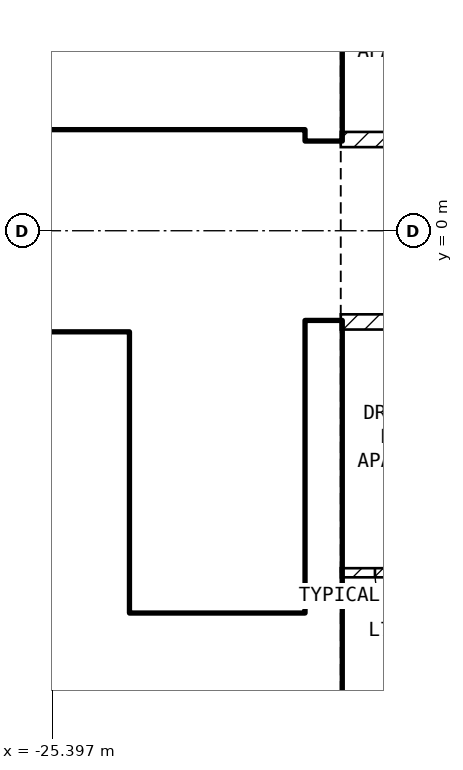
"""IFC4 building model, lengths in metres.
Left out: names, types, materials, properties, quantities, classifications, styles, units other than length and angle.
Written with IfcOpenShell. Run it as: python <this file> out.ifc"""

import sys

from ifc_helpers import new_model, si_unit, direction, frame, frame_2d, origin, place, context, subcontext, project, spatial, rectangle, extrude, element, fill, save


model = new_model("IFC4")
c1 = context("Model", 3, precision=1e-05, world=origin(), true_north=direction((0.0, 1.0)))
c2 = subcontext(c1, "Body", "Model", "MODEL_VIEW")
j1 = project(units=[si_unit("LENGTHUNIT", "METRE"), si_unit("PLANEANGLEUNIT", "RADIAN")], contexts=[c1])
p1 = place(None, origin())
s1 = spatial("IfcSite", under=j1, at=p1, CompositionType="ELEMENT")
p2 = place(p1, origin())
s2 = spatial("IfcBuilding", under=s1, at=p2, CompositionType="ELEMENT")
p3 = place(p2, frame((0.0, 0.0, 281.5)))
s3 = spatial("IfcBuildingStorey", under=s2, at=p3, CompositionType="ELEMENT", Elevation=281.5)
for number, where, z_axis, x_axis in (
    (1, (-21.825, -8.1, 0.0), (0.0, 0.0, 1.0), (0.0, 1.0, 0.0)),
    (2, (-21.825, 1.2, 0.0), (0.0, 0.0, 1.0), (0.0, 1.0, 0.0)),
):
    element("IfcWall", number, at=place(p3, frame(where, z_axis=z_axis, x_axis=x_axis)), inside=s3, PredefinedType="SHEAR", context=c2, shape_type="SweptSolid", body=[
        extrude(rectangle(XDim=6.9, YDim=0.45, at=frame_2d((3.45, 0.0))), origin(), (0.0, 0.0, 1.0), 3.2),
    ])
p4 = place(p3, frame((-33.35, 1.45, 0.0), z_axis=(0.0, 0.0, 1.0), x_axis=(1.0, 0.0, 0.0)))
e3 = element("IfcWall", 3, at=p4, inside=s3, PredefinedType="SOLIDWALL", context=c2, shape_type="SweptSolid", body=[
    extrude(rectangle(XDim=11.3, YDim=0.2, at=frame_2d((5.65, 0.0))), origin(), (0.0, 0.0, 1.0), 3.2),
])
p5 = place(p4, frame((9.55, 0.0, 0.0)))
e4 = element("IfcOpeningElement", 4, at=p5, cuts=e3, PredefinedType="OPENING", context=c2, shape_type="SweptSolid", body=[
    extrude(rectangle(XDim=1.0, YDim=2.1, at=frame_2d((0.5, 1.05))), frame((0.0, 0.11, 0.0), z_axis=(0.0, -1.0, 0.0), x_axis=(1.0, 0.0, 0.0)), (0.0, 0.0, 1.0), 0.22),
])
p6 = place(p4, frame((7.05, 0.0, 0.0)))
e5 = element("IfcOpeningElement", 5, at=p6, cuts=e3, PredefinedType="OPENING", context=c2, shape_type="SweptSolid", body=[
    extrude(rectangle(XDim=1.0, YDim=2.1, at=frame_2d((0.5, 1.05))), frame((0.0, 0.11, 0.0), z_axis=(0.0, -1.0, 0.0), x_axis=(1.0, 0.0, 0.0)), (0.0, 0.0, 1.0), 0.22),
])
p7 = place(p4, frame((1.175, 0.0, 0.0)))
e6 = element("IfcOpeningElement", 6, at=p7, cuts=e3, PredefinedType="OPENING", context=c2, shape_type="SweptSolid", body=[
    extrude(rectangle(XDim=0.9, YDim=2.1, at=frame_2d((0.45, 1.05))), frame((0.0, 0.11, 0.0), z_axis=(0.0, -1.0, 0.0), x_axis=(1.0, 0.0, 0.0)), (0.0, 0.0, 1.0), 0.22),
])
p8 = place(p3, frame((-24.5, -5.05, 0.0), z_axis=(0.0, 0.0, 1.0), x_axis=(0.0, 1.0, 0.0)))
e7 = element("IfcWall", 7, at=p8, inside=s3, PredefinedType="SOLIDWALL", context=c2, shape_type="SweptSolid", body=[
    extrude(rectangle(XDim=3.7, YDim=0.2, at=frame_2d((1.85, 0.0))), origin(), (0.0, 0.0, 1.0), 3.2),
])
p9 = place(p8, frame((0.1, 0.0, 0.0)))
e8 = element("IfcOpeningElement", 8, at=p9, cuts=e7, PredefinedType="OPENING", context=c2, shape_type="SweptSolid", body=[
    extrude(rectangle(XDim=0.8, YDim=2.1, at=frame_2d((0.4, 1.05))), frame((0.0, 0.11, 0.0), z_axis=(0.0, -1.0, 0.0), x_axis=(1.0, 0.0, 0.0)), (0.0, 0.0, 1.0), 0.22),
])
p10 = place(p3, frame((-28.35, -5.15, 0.0), z_axis=(0.0, 0.0, 1.0), x_axis=(1.0, 0.0, 0.0)))
e9 = element("IfcWall", 9, at=p10, inside=s3, PredefinedType="SOLIDWALL", context=c2, shape_type="SweptSolid", body=[
    extrude(rectangle(XDim=6.3, YDim=0.2, at=frame_2d((3.15, 0.0))), origin(), (0.0, 0.0, 1.0), 3.2),
])
p11 = place(p10, frame((5.1, 0.0, 0.0)))
e10 = element("IfcOpeningElement", 10, at=p11, cuts=e9, PredefinedType="OPENING", context=c2, shape_type="SweptSolid", body=[
    extrude(rectangle(XDim=1.0, YDim=2.1, at=frame_2d((0.5, 1.05))), frame((0.0, 0.11, 0.0), z_axis=(0.0, -1.0, 0.0), x_axis=(1.0, 0.0, 0.0)), (0.0, 0.0, 1.0), 0.22),
])
p12 = place(p3, frame((-33.35, -1.45, 0.0), z_axis=(0.0, 0.0, 1.0), x_axis=(1.0, 0.0, 0.0)))
e11 = element("IfcWall", 11, at=p12, inside=s3, PredefinedType="SOLIDWALL", context=c2, shape_type="SweptSolid", body=[
    extrude(rectangle(XDim=8.75, YDim=0.2, at=frame_2d((4.375, 0.0))), origin(), (0.0, 0.0, 1.0), 3.2),
])
p13 = place(p12, frame((7.35, 0.0, 0.0)))
e12 = element("IfcOpeningElement", 12, at=p13, cuts=e11, PredefinedType="OPENING", context=c2, shape_type="SweptSolid", body=[
    extrude(rectangle(XDim=1.0, YDim=2.1, at=frame_2d((0.5, 1.05))), frame((0.0, 0.11, 0.0), z_axis=(0.0, -1.0, 0.0), x_axis=(1.0, 0.0, 0.0)), (0.0, 0.0, 1.0), 0.22),
])
p14 = place(p12, frame((5.35, 0.0, 0.0)))
e13 = element("IfcOpeningElement", 13, at=p14, cuts=e11, PredefinedType="OPENING", context=c2, shape_type="SweptSolid", body=[
    extrude(rectangle(XDim=1.0, YDim=2.1, at=frame_2d((0.5, 1.05))), frame((0.0, 0.11, 0.0), z_axis=(0.0, -1.0, 0.0), x_axis=(1.0, 0.0, 0.0)), (0.0, 0.0, 1.0), 0.22),
])
p15 = place(p12, frame((3.35, 0.0, 0.0)))
e14 = element("IfcOpeningElement", 14, at=p15, cuts=e11, PredefinedType="OPENING", context=c2, shape_type="SweptSolid", body=[
    extrude(rectangle(XDim=1.0, YDim=2.1, at=frame_2d((0.5, 1.05))), frame((0.0, 0.11, 0.0), z_axis=(0.0, -1.0, 0.0), x_axis=(1.0, 0.0, 0.0)), (0.0, 0.0, 1.0), 0.22),
])
p16 = place(p12, frame((0.925, 0.0, 0.0)))
e15 = element("IfcOpeningElement", 15, at=p16, cuts=e11, PredefinedType="OPENING", context=c2, shape_type="SweptSolid", body=[
    extrude(rectangle(XDim=0.9, YDim=2.1, at=frame_2d((0.45, 1.05))), frame((0.0, 0.11, 0.0), z_axis=(0.0, -1.0, 0.0), x_axis=(1.0, 0.0, 0.0)), (0.0, 0.0, 1.0), 0.22),
])
p17 = place(p3, frame((-33.35, -3.95, 0.0), z_axis=(0.0, 0.0, 1.0), x_axis=(1.0, 0.0, 0.0)))
e16 = element("IfcWall", 16, at=p17, inside=s3, PredefinedType="SOLIDWALL", context=c2, shape_type="SweptSolid", body=[
    extrude(rectangle(XDim=8.75, YDim=0.2, at=frame_2d((4.375, 0.0))), origin(), (0.0, 0.0, 1.0), 3.2),
])
p18 = place(p3, frame((-21.6, 1.2, 0.0), z_axis=(0.0, 0.0, 1.0), x_axis=(1.0, 0.0, 0.0)))
e17 = element("IfcWall", 17, at=p18, inside=s3, PredefinedType="PARTITIONING", context=c2, shape_type="SweptSolid", body=[
    extrude(rectangle(XDim=17.2, YDim=0.2, at=frame_2d((8.6, 0.0))), origin(), (0.0, 0.0, 1.0), 3.2),
])
p19 = place(p18, frame((10.3, 0.0, 0.0)))
e18 = element("IfcOpeningElement", 18, at=p19, cuts=e17, PredefinedType="OPENING", context=c2, shape_type="SweptSolid", body=[
    extrude(rectangle(XDim=1.0, YDim=2.1, at=frame_2d((0.5, 1.05))), frame((0.0, 0.11, 0.0), z_axis=(0.0, -1.0, 0.0), x_axis=(1.0, 0.0, 0.0)), (0.0, 0.0, 1.0), 0.22),
])
p20 = place(p3, frame((-4.4, -1.2, 0.0), z_axis=(0.0, 0.0, 1.0), x_axis=(-1.0, 0.0, 0.0)))
e19 = element("IfcWall", 19, at=p20, inside=s3, PredefinedType="PARTITIONING", context=c2, shape_type="SweptSolid", body=[
    extrude(rectangle(XDim=17.2, YDim=0.2, at=frame_2d((8.6, 0.0))), origin(), (0.0, 0.0, 1.0), 3.2),
])
p21 = place(p20, frame((5.9, 0.0, 0.0)))
e20 = element("IfcOpeningElement", 20, at=p21, cuts=e19, PredefinedType="OPENING", context=c2, shape_type="SweptSolid", body=[
    extrude(rectangle(XDim=1.0, YDim=2.1, at=frame_2d((0.5, 1.05))), frame((0.0, 0.11, 0.0), z_axis=(0.0, -1.0, 0.0), x_axis=(1.0, 0.0, 0.0)), (0.0, 0.0, 1.0), 0.22),
])
p22 = place(p3, frame((-19.8, -4.5, 0.0), z_axis=(0.0, 0.0, 1.0), x_axis=(-1.0, 0.0, 0.0)))
e21 = element("IfcWall", 21, at=p22, inside=s3, PredefinedType="PARTITIONING", context=c2, shape_type="SweptSolid", body=[
    extrude(rectangle(XDim=1.8, YDim=0.12, at=frame_2d((0.9, 0.0))), origin(), (0.0, 0.0, 1.0), 3.2),
])
p23 = place(p22, frame((0.45, 0.0, 0.0)))
e22 = element("IfcOpeningElement", 22, at=p23, cuts=e21, PredefinedType="OPENING", context=c2, shape_type="SweptSolid", body=[
    extrude(rectangle(XDim=0.9, YDim=2.1, at=frame_2d((0.45, 1.05))), frame((0.0, 0.07, 0.0), z_axis=(0.0, -1.0, 0.0), x_axis=(1.0, 0.0, 0.0)), (0.0, 0.0, 1.0), 0.14),
])
p24 = place(p13, origin())
e23 = element("IfcDoor", 23, at=p24, inside=s3, OperationType="DOUBLE_DOOR_SLIDING", PredefinedType="DOOR", context=c2, shape_type="SweptSolid", body=[
    extrude(rectangle(XDim=1.0, YDim=2.1, at=frame_2d((0.5, 1.05))), frame((0.0, 0.025, 0.0), z_axis=(0.0, -1.0, 0.0), x_axis=(1.0, 0.0, 0.0)), (0.0, 0.0, 1.0), 0.05),
])
fill(e12, e23)
p25 = place(p11, origin())
e24 = element("IfcDoor", 24, at=p25, inside=s3, OperationType="SINGLE_SWING_LEFT", PredefinedType="DOOR", context=c2, shape_type="SweptSolid", body=[
    extrude(rectangle(XDim=1.0, YDim=2.1, at=frame_2d((0.5, 1.05))), frame((0.0, 0.025, 0.0), z_axis=(0.0, -1.0, 0.0), x_axis=(1.0, 0.0, 0.0)), (0.0, 0.0, 1.0), 0.05),
])
fill(e10, e24)
p26 = place(p5, origin())
e25 = element("IfcDoor", 25, at=p26, inside=s3, OperationType="SINGLE_SWING_LEFT", PredefinedType="DOOR", context=c2, shape_type="SweptSolid", body=[
    extrude(rectangle(XDim=1.0, YDim=2.1, at=frame_2d((0.5, 1.05))), frame((0.0, 0.025, 0.0), z_axis=(0.0, -1.0, 0.0), x_axis=(1.0, 0.0, 0.0)), (0.0, 0.0, 1.0), 0.05),
])
fill(e4, e25)
p27 = place(p9, origin())
e26 = element("IfcDoor", 26, at=p27, inside=s3, OperationType="SINGLE_SWING_LEFT", PredefinedType="DOOR", context=c2, shape_type="SweptSolid", body=[
    extrude(rectangle(XDim=0.8, YDim=2.1, at=frame_2d((0.4, 1.05))), frame((0.0, 0.025, 0.0), z_axis=(0.0, -1.0, 0.0), x_axis=(1.0, 0.0, 0.0)), (0.0, 0.0, 1.0), 0.05),
])
fill(e8, e26)
p28 = place(p6, origin())
e27 = element("IfcDoor", 27, at=p28, inside=s3, OperationType="SINGLE_SWING_LEFT", PredefinedType="DOOR", context=c2, shape_type="SweptSolid", body=[
    extrude(rectangle(XDim=1.0, YDim=2.1, at=frame_2d((0.5, 1.05))), frame((0.0, 0.025, 0.0), z_axis=(0.0, -1.0, 0.0), x_axis=(1.0, 0.0, 0.0)), (0.0, 0.0, 1.0), 0.05),
])
fill(e5, e27)
p29 = place(p23, origin())
e28 = element("IfcDoor", 28, at=p29, inside=s3, OperationType="SINGLE_SWING_LEFT", PredefinedType="DOOR", context=c2, shape_type="SweptSolid", body=[
    extrude(rectangle(XDim=0.9, YDim=2.1, at=frame_2d((0.45, 1.05))), frame((0.0, 0.025, 0.0), z_axis=(0.0, -1.0, 0.0), x_axis=(1.0, 0.0, 0.0)), (0.0, 0.0, 1.0), 0.05),
])
fill(e22, e28)
save(model, sys.argv[1])
